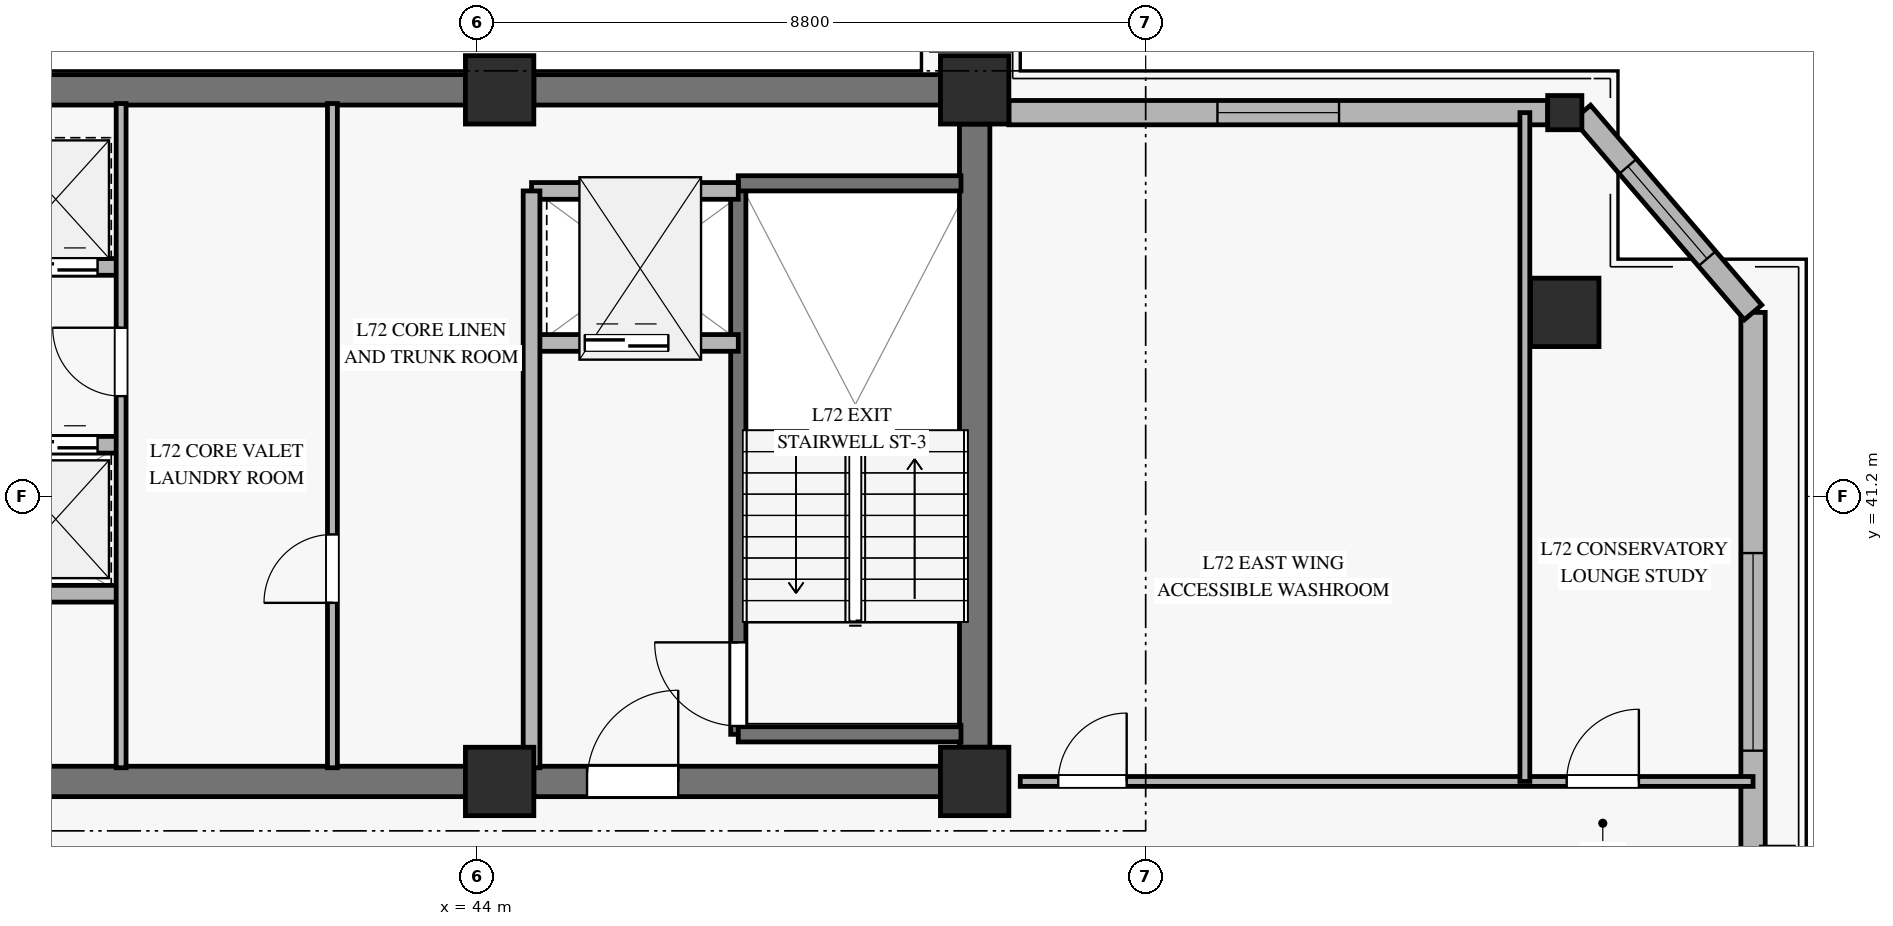
"""IFC4 building model, lengths in metres.
Left out: names, types, materials, properties, quantities, classifications, styles, units other than length and angle.
Written with IfcOpenShell. Run it as: python <this file> out.ifc"""

import sys

from ifc_helpers import new_model, si_unit, direction, frame, frame_2d, origin, origin_2d, place, context, subcontext, project, spatial, rectangle, hollow_rectangle, extrude, source, transform, mapped, element, fill, save


model = new_model("IFC4")
c1 = context("Model", 3, precision=1e-05, world=origin(), true_north=direction((0.0, 1.0)))
c2 = subcontext(c1, "Body", "Model", "MODEL_VIEW")
j1 = project(units=[si_unit("LENGTHUNIT", "METRE"), si_unit("PLANEANGLEUNIT", "RADIAN")], contexts=[c1])
p1 = place(None, origin())
s1 = spatial("IfcSite", under=j1, at=p1, CompositionType="ELEMENT")
p2 = place(p1, origin())
s2 = spatial("IfcBuilding", under=s1, at=p2, CompositionType="ELEMENT")
p3 = place(p2, frame((0.0, 0.0, 279.1)))
s3 = spatial("IfcBuildingStorey", under=s2, at=p3, CompositionType="ELEMENT", Elevation=279.1)
m1 = source(origin(), c2, "Body", "SweptSolid", [
    extrude(rectangle(XDim=0.9, YDim=0.9, at=origin_2d()), origin(), (0.0, 0.0, 1.0), 6.52),
])
for number, where, z_axis, x_axis in (
    (1, (44.3, 37.45, 0.0), (0.0, 0.0, 1.0), (1.0, 0.0, 0.0)),
    (2, (44.3, 46.55, 0.0), (0.0, 0.0, 1.0), (1.0, 0.0, 0.0)),
    (3, (50.55, 37.45, 0.0), (0.0, 0.0, 1.0), (1.0, 0.0, 0.0)),
    (4, (50.55, 46.55, 0.0), (0.0, 0.0, 1.0), (1.0, 0.0, 0.0)),
):
    element("IfcColumn", number, at=place(p3, frame(where, z_axis=z_axis, x_axis=x_axis)), inside=s3, PredefinedType="PILASTER", context=c2, shape_type="MappedRepresentation", body=[
        mapped(m1, transform((0.0, 0.0, 0.0), x_axis=(1.0, 0.0, 0.0), y_axis=(0.0, 1.0, 0.0), z_axis=(0.0, 0.0, 1.0), scale=1.0)),
    ])
p4 = place(p3, frame((36.05, 46.55, 0.0), z_axis=(0.0, 0.0, 1.0), x_axis=(1.0, 0.0, 0.0)))
e5 = element("IfcWall", 5, at=p4, inside=s3, PredefinedType="SHEAR", context=c2, shape_type="SweptSolid", body=[
    extrude(rectangle(XDim=7.8, YDim=0.4, at=frame_2d((3.9, 0.0))), origin(), (0.0, 0.0, 1.0), 6.52),
])
p5 = place(p3, frame((44.75, 46.55, 0.0), z_axis=(0.0, 0.0, 1.0), x_axis=(1.0, 0.0, 0.0)))
e6 = element("IfcWall", 6, at=p5, inside=s3, PredefinedType="SHEAR", context=c2, shape_type="SweptSolid", body=[
    extrude(rectangle(XDim=5.35, YDim=0.4, at=frame_2d((2.675, 0.0))), origin(), (0.0, 0.0, 1.0), 6.52),
])
p6 = place(p3, frame((36.05, 37.45, 0.0), z_axis=(0.0, 0.0, 1.0), x_axis=(1.0, 0.0, 0.0)))
e7 = element("IfcWall", 7, at=p6, inside=s3, PredefinedType="SHEAR", context=c2, shape_type="SweptSolid", body=[
    extrude(rectangle(XDim=7.8, YDim=0.4, at=frame_2d((3.9, 0.0))), origin(), (0.0, 0.0, 1.0), 6.52),
])
p7 = place(p3, frame((44.75, 37.45, 0.0), z_axis=(0.0, 0.0, 1.0), x_axis=(1.0, 0.0, 0.0)))
e8 = element("IfcWall", 8, at=p7, inside=s3, PredefinedType="SHEAR", context=c2, shape_type="SweptSolid", body=[
    extrude(rectangle(XDim=5.35, YDim=0.4, at=frame_2d((2.675, 0.0))), origin(), (0.0, 0.0, 1.0), 6.52),
])
p8 = place(p7, frame((0.7, 0.0, 0.0)))
e9 = element("IfcOpeningElement", 9, at=p8, cuts=e8, PredefinedType="OPENING", context=c2, shape_type="SweptSolid", body=[
    extrude(rectangle(XDim=1.2, YDim=2.15, at=frame_2d((0.6, 1.075))), frame((0.0, 0.21, 0.0), z_axis=(0.0, -1.0, 0.0), x_axis=(1.0, 0.0, 0.0)), (0.0, 0.0, 1.0), 0.42),
])
p9 = place(p3, frame((50.55, 37.9, 0.0), z_axis=(0.0, 0.0, 1.0), x_axis=(0.0, 1.0, 0.0)))
e10 = element("IfcWall", 10, at=p9, inside=s3, PredefinedType="SHEAR", context=c2, shape_type="SweptSolid", body=[
    extrude(rectangle(XDim=8.2, YDim=0.4, at=frame_2d((4.1, 0.0))), origin(), (0.0, 0.0, 1.0), 6.52),
])
m2 = source(origin(), c2, "Body", "SweptSolid", [
    extrude(hollow_rectangle(XDim=0.9, YDim=0.9, WallThickness=0.04, at=origin_2d()), origin(), (0.0, 0.0, 1.0), 6.52),
])
p10 = place(p3, frame((58.314, 43.622, 0.0), z_axis=(0.0, 0.0, 1.0), x_axis=(1.0, 0.0, 0.0)))
e11 = element("IfcColumn", 11, at=p10, inside=s3, PredefinedType="COLUMN", context=c2, shape_type="MappedRepresentation", body=[
    mapped(m2, transform((0.0, 0.0, 0.0), x_axis=(1.0, 0.0, 0.0), y_axis=(0.0, 1.0, 0.0), z_axis=(0.0, 0.0, 1.0), scale=1.0)),
])
m3 = source(origin(), c2, "Body", "SweptSolid", [
    extrude(hollow_rectangle(XDim=0.45, YDim=0.45, WallThickness=0.022, at=origin_2d()), origin(), (0.0, 0.0, 1.0), 6.52),
])
p11 = place(p3, frame((58.314, 46.25, 0.0), z_axis=(0.0, 0.0, 1.0), x_axis=(1.0, 0.0, 0.0)))
e12 = element("IfcColumn", 12, at=p11, inside=s3, PredefinedType="COLUMN", context=c2, shape_type="MappedRepresentation", body=[
    mapped(m3, transform((0.0, 0.0, 0.0), x_axis=(1.0, 0.0, 0.0), y_axis=(0.0, 1.0, 0.0), z_axis=(0.0, 0.0, 1.0), scale=1.0)),
])
p12 = place(p3, frame((60.791, 32.229, 0.0), z_axis=(0.0, 0.0, 1.0), x_axis=(0.0, 1.0, 0.0)))
e13 = element("IfcWall", 13, at=p12, inside=s3, PredefinedType="SOLIDWALL", context=c2, shape_type="SweptSolid", body=[
    extrude(rectangle(XDim=11.393, YDim=0.32, at=frame_2d((5.697, 0.0))), origin(), (0.0, 0.0, 1.0), 6.15),
])
p13 = place(p12, frame((5.626, 0.0, 0.45)))
e14 = element("IfcOpeningElement", 14, at=p13, cuts=e13, PredefinedType="OPENING", context=c2, shape_type="SweptSolid", body=[
    extrude(rectangle(XDim=2.6, YDim=2.4, at=frame_2d((1.3, 1.2))), frame((0.0, 0.17, 0.0), z_axis=(0.0, -1.0, 0.0), x_axis=(1.0, 0.0, 0.0)), (0.0, 0.0, 1.0), 0.34),
])
p14 = place(p3, frame((51.0, 46.25, 0.0), z_axis=(0.0, 0.0, 1.0), x_axis=(1.0, 0.0, 0.0)))
e15 = element("IfcWall", 15, at=p14, inside=s3, PredefinedType="SOLIDWALL", context=c2, shape_type="SweptSolid", body=[
    extrude(rectangle(XDim=7.089, YDim=0.32, at=frame_2d((3.544, 0.0))), origin(), (0.0, 0.0, 1.0), 6.15),
])
p15 = place(p14, frame((2.744, 0.0, 0.45)))
e16 = element("IfcOpeningElement", 16, at=p15, cuts=e15, PredefinedType="OPENING", context=c2, shape_type="SweptSolid", body=[
    extrude(rectangle(XDim=1.6, YDim=2.0, at=frame_2d((0.8, 1.0))), frame((0.0, 0.17, 0.0), z_axis=(0.0, -1.0, 0.0), x_axis=(1.0, 0.0, 0.0)), (0.0, 0.0, 1.0), 0.34),
])
p16 = place(p3, frame((60.791, 43.622, 0.0), z_axis=(0.0, 0.0, 1.0), x_axis=(-0.650698416405, 0.759336269968, 0.0)))
e17 = element("IfcWall", 17, at=p16, inside=s3, PredefinedType="SOLIDWALL", context=c2, shape_type="SweptSolid", body=[
    extrude(rectangle(XDim=3.461, YDim=0.3, at=frame_2d((1.73, 0.0))), origin(), (0.0, 0.0, 1.0), 6.15),
])
p17 = place(p16, frame((0.93, 0.0, 0.45)))
e18 = element("IfcOpeningElement", 18, at=p17, cuts=e17, PredefinedType="OPENING", context=c2, shape_type="SweptSolid", body=[
    extrude(rectangle(XDim=1.6, YDim=2.0, at=frame_2d((0.8, 1.0))), frame((0.0, 0.16, 0.0), z_axis=(0.0, -1.0, 0.0), x_axis=(1.0, 0.0, 0.0)), (0.0, 0.0, 1.0), 0.32),
])
p18 = place(p3, frame((47.44, 38.07, 0.0), z_axis=(0.0, 0.0, 1.0), x_axis=(0.0, 1.0, 0.0)))
e19 = element("IfcWall", 19, at=p18, inside=s3, PredefinedType="SOLIDWALL", context=c2, shape_type="SweptSolid", body=[
    extrude(rectangle(XDim=7.25, YDim=0.2, at=frame_2d((3.625, 0.0))), origin(), (0.0, 0.0, 1.0), 6.8),
])
p19 = place(p18, frame((0.11, 0.0, 0.0)))
e20 = element("IfcOpeningElement", 20, at=p19, cuts=e19, PredefinedType="OPENING", context=c2, shape_type="SweptSolid", body=[
    extrude(rectangle(XDim=1.1, YDim=2.15, at=frame_2d((0.55, 1.075))), frame((0.0, 0.11, 0.0), z_axis=(0.0, -1.0, 0.0), x_axis=(1.0, 0.0, 0.0)), (0.0, 0.0, 1.0), 0.22),
])
for number, where, z_axis, x_axis in (
    (21, (47.44, 45.32, 0.0), (0.0, 0.0, 1.0), (1.0, 0.0, 0.0)),
    (22, (47.44, 38.07, 0.0), (0.0, 0.0, 1.0), (1.0, 0.0, 0.0)),
):
    element("IfcWall", number, at=place(p3, frame(where, z_axis=z_axis, x_axis=x_axis)), inside=s3, PredefinedType="SOLIDWALL", context=c2, shape_type="SweptSolid", body=[
        extrude(rectangle(XDim=2.93, YDim=0.2, at=frame_2d((1.465, 0.0))), origin(), (0.0, 0.0, 1.0), 6.8),
    ])
p20 = place(p3, frame((44.72, 43.22, 0.0), z_axis=(0.0, 0.0, 1.0), x_axis=(1.0, 0.0, 0.0)))
e23 = element("IfcWall", 23, at=p20, inside=s3, PredefinedType="SOLIDWALL", context=c2, shape_type="SweptSolid", body=[
    extrude(rectangle(XDim=2.72, YDim=0.22, at=frame_2d((1.36, 0.0))), origin(), (0.0, 0.0, 1.0), 6.52),
])
p21 = place(p20, frame((0.7, 0.0, 0.0)))
e24 = element("IfcOpeningElement", 24, at=p21, cuts=e23, PredefinedType="OPENING", context=c2, shape_type="SweptSolid", body=[
    extrude(rectangle(XDim=1.1, YDim=2.2, at=frame_2d((0.55, 1.1))), frame((0.0, 0.12, 0.0), z_axis=(0.0, -1.0, 0.0), x_axis=(1.0, 0.0, 0.0)), (0.0, 0.0, 1.0), 0.24),
])
p22 = place(p3, frame((44.72, 45.22, 0.0), z_axis=(0.0, 0.0, 1.0), x_axis=(1.0, 0.0, 0.0)))
e25 = element("IfcWall", 25, at=p22, inside=s3, PredefinedType="SOLIDWALL", context=c2, shape_type="SweptSolid", body=[
    extrude(rectangle(XDim=2.72, YDim=0.22, at=frame_2d((1.36, 0.0))), origin(), (0.0, 0.0, 1.0), 6.52),
])
p23 = place(p3, frame((44.72, 37.63, 0.0), z_axis=(0.0, 0.0, 1.0), x_axis=(0.0, 1.0, 0.0)))
e26 = element("IfcWall", 26, at=p23, inside=s3, PredefinedType="SOLIDWALL", context=c2, shape_type="SweptSolid", body=[
    extrude(rectangle(XDim=7.59, YDim=0.22, at=frame_2d((3.795, 0.0))), origin(), (0.0, 0.0, 1.0), 6.52),
])
p24 = place(p3, frame((36.12, 44.22, 0.0), z_axis=(0.0, 0.0, 1.0), x_axis=(1.0, 0.0, 0.0)))
e27 = element("IfcWall", 27, at=p24, inside=s3, PredefinedType="SOLIDWALL", context=c2, shape_type="SweptSolid", body=[
    extrude(rectangle(XDim=3.2, YDim=0.22, at=frame_2d((1.6, 0.0))), origin(), (0.0, 0.0, 1.0), 6.52),
])
p25 = place(p24, frame((0.3, 0.0, 0.0)))
e28 = element("IfcOpeningElement", 28, at=p25, cuts=e27, PredefinedType="OPENING", context=c2, shape_type="SweptSolid", body=[
    extrude(rectangle(XDim=1.1, YDim=2.2, at=frame_2d((0.55, 1.1))), frame((0.0, 0.12, 0.0), z_axis=(0.0, -1.0, 0.0), x_axis=(1.0, 0.0, 0.0)), (0.0, 0.0, 1.0), 0.24),
])
p26 = place(p24, frame((1.79, 0.0, 0.0)))
e29 = element("IfcOpeningElement", 29, at=p26, cuts=e27, PredefinedType="OPENING", context=c2, shape_type="SweptSolid", body=[
    extrude(rectangle(XDim=1.1, YDim=2.2, at=frame_2d((0.55, 1.1))), frame((0.0, 0.12, 0.0), z_axis=(0.0, -1.0, 0.0), x_axis=(1.0, 0.0, 0.0)), (0.0, 0.0, 1.0), 0.24),
])
p27 = place(p3, frame((36.12, 41.88, 0.0), z_axis=(0.0, 0.0, 1.0), x_axis=(1.0, 0.0, 0.0)))
e30 = element("IfcWall", 30, at=p27, inside=s3, PredefinedType="SOLIDWALL", context=c2, shape_type="SweptSolid", body=[
    extrude(rectangle(XDim=3.2, YDim=0.22, at=frame_2d((1.6, 0.0))), origin(), (0.0, 0.0, 1.0), 6.52),
])
p28 = place(p27, frame((0.3, 0.0, 0.0)))
e31 = element("IfcOpeningElement", 31, at=p28, cuts=e30, PredefinedType="OPENING", context=c2, shape_type="SweptSolid", body=[
    extrude(rectangle(XDim=1.1, YDim=2.2, at=frame_2d((0.55, 1.1))), frame((0.0, 0.12, 0.0), z_axis=(0.0, -1.0, 0.0), x_axis=(1.0, 0.0, 0.0)), (0.0, 0.0, 1.0), 0.24),
])
p29 = place(p27, frame((1.79, 0.0, 0.0)))
e32 = element("IfcOpeningElement", 32, at=p29, cuts=e30, PredefinedType="OPENING", context=c2, shape_type="SweptSolid", body=[
    extrude(rectangle(XDim=1.1, YDim=2.2, at=frame_2d((0.55, 1.1))), frame((0.0, 0.12, 0.0), z_axis=(0.0, -1.0, 0.0), x_axis=(1.0, 0.0, 0.0)), (0.0, 0.0, 1.0), 0.24),
])
p30 = place(p3, frame((36.12, 39.92, 0.0), z_axis=(0.0, 0.0, 1.0), x_axis=(1.0, 0.0, 0.0)))
e33 = element("IfcWall", 33, at=p30, inside=s3, PredefinedType="SOLIDWALL", context=c2, shape_type="SweptSolid", body=[
    extrude(rectangle(XDim=3.2, YDim=0.22, at=frame_2d((1.6, 0.0))), origin(), (0.0, 0.0, 1.0), 6.52),
])
p31 = place(p3, frame((39.32, 37.63, 0.0), z_axis=(0.0, 0.0, 1.0), x_axis=(0.0, 1.0, 0.0)))
e34 = element("IfcWall", 34, at=p31, inside=s3, PredefinedType="PARTITIONING", context=c2, shape_type="SweptSolid", body=[
    extrude(rectangle(XDim=8.74, YDim=0.13, at=frame_2d((4.37, 0.0))), origin(), (0.0, 0.0, 1.0), 6.52),
])
p32 = place(p31, frame((4.89, 0.0, 0.0)))
e35 = element("IfcOpeningElement", 35, at=p32, cuts=e34, PredefinedType="OPENING", context=c2, shape_type="SweptSolid", body=[
    extrude(rectangle(XDim=0.9, YDim=2.1, at=frame_2d((0.45, 1.05))), frame((0.0, 0.075, 0.0), z_axis=(0.0, -1.0, 0.0), x_axis=(1.0, 0.0, 0.0)), (0.0, 0.0, 1.0), 0.15),
])
p33 = place(p3, frame((42.1, 37.63, 0.0), z_axis=(0.0, 0.0, 1.0), x_axis=(0.0, 1.0, 0.0)))
e36 = element("IfcWall", 36, at=p33, inside=s3, PredefinedType="PARTITIONING", context=c2, shape_type="SweptSolid", body=[
    extrude(rectangle(XDim=8.74, YDim=0.13, at=frame_2d((4.37, 0.0))), origin(), (0.0, 0.0, 1.0), 6.52),
])
p34 = place(p33, frame((2.17, 0.0, 0.0)))
e37 = element("IfcOpeningElement", 37, at=p34, cuts=e36, PredefinedType="OPENING", context=c2, shape_type="SweptSolid", body=[
    extrude(rectangle(XDim=0.9, YDim=2.1, at=frame_2d((0.45, 1.05))), frame((0.0, 0.075, 0.0), z_axis=(0.0, -1.0, 0.0), x_axis=(1.0, 0.0, 0.0)), (0.0, 0.0, 1.0), 0.15),
])
p35 = place(p3, frame((51.15, 37.45, 0.0), z_axis=(0.0, 0.0, 1.0), x_axis=(1.0, 0.0, 0.0)))
e38 = element("IfcWall", 38, at=p35, inside=s3, PredefinedType="PARTITIONING", context=c2, shape_type="SweptSolid", body=[
    extrude(rectangle(XDim=9.641, YDim=0.13, at=frame_2d((4.821, 0.0))), origin(), (0.0, 0.0, 1.0), 6.155),
])
p36 = place(p35, frame((0.5, 0.0, 0.0)))
e39 = element("IfcOpeningElement", 39, at=p36, cuts=e38, PredefinedType="OPENING", context=c2, shape_type="SweptSolid", body=[
    extrude(rectangle(XDim=0.9, YDim=2.1, at=frame_2d((0.45, 1.05))), frame((0.0, 0.075, 0.0), z_axis=(0.0, -1.0, 0.0), x_axis=(1.0, 0.0, 0.0)), (0.0, 0.0, 1.0), 0.15),
])
p37 = place(p35, frame((7.189, 0.0, 0.0)))
e40 = element("IfcOpeningElement", 40, at=p37, cuts=e38, PredefinedType="OPENING", context=c2, shape_type="SweptSolid", body=[
    extrude(rectangle(XDim=0.95, YDim=2.1, at=frame_2d((0.475, 1.05))), frame((0.0, 0.075, 0.0), z_axis=(0.0, -1.0, 0.0), x_axis=(1.0, 0.0, 0.0)), (0.0, 0.0, 1.0), 0.15),
])
p38 = place(p3, frame((57.789, 37.45, 0.0), z_axis=(0.0, 0.0, 1.0), x_axis=(0.0, 1.0, 0.0)))
e41 = element("IfcWall", 41, at=p38, inside=s3, PredefinedType="PARTITIONING", context=c2, shape_type="SweptSolid", body=[
    extrude(rectangle(XDim=8.8, YDim=0.13, at=frame_2d((4.4, 0.0))), origin(), (0.0, 0.0, 1.0), 6.52),
])
m4 = source(origin(), c2, "Body", "SweptSolid", [
    extrude(rectangle(XDim=2.6, YDim=2.4, at=frame_2d((1.3, 1.2))), frame((0.0, 0.03, 0.0), z_axis=(0.0, -1.0, 0.0), x_axis=(1.0, 0.0, 0.0)), (0.0, 0.0, 1.0), 0.06),
])
p39 = place(p13, origin())
e42 = element("IfcWindow", 42, at=p39, inside=s3, PartitioningType="SINGLE_PANEL", PredefinedType="WINDOW", context=c2, shape_type="MappedRepresentation", body=[
    mapped(m4, transform((0.0, 0.0, 0.0), x_axis=(1.0, 0.0, 0.0), y_axis=(0.0, 1.0, 0.0), z_axis=(0.0, 0.0, 1.0), scale=1.0)),
])
fill(e14, e42)
m5 = source(origin(), c2, "Body", "SweptSolid", [
    extrude(rectangle(XDim=1.6, YDim=2.0, at=frame_2d((0.8, 1.0))), frame((0.0, 0.03, 0.0), z_axis=(0.0, -1.0, 0.0), x_axis=(1.0, 0.0, 0.0)), (0.0, 0.0, 1.0), 0.06),
])
p40 = place(p15, origin())
e43 = element("IfcWindow", 43, at=p40, inside=s3, PartitioningType="SINGLE_PANEL", PredefinedType="WINDOW", context=c2, shape_type="MappedRepresentation", body=[
    mapped(m5, transform((0.0, 0.0, 0.0), x_axis=(1.0, 0.0, 0.0), y_axis=(0.0, 1.0, 0.0), z_axis=(0.0, 0.0, 1.0), scale=1.0)),
])
fill(e16, e43)
p41 = place(p17, origin())
e44 = element("IfcWindow", 44, at=p41, inside=s3, PartitioningType="SINGLE_PANEL", PredefinedType="WINDOW", context=c2, shape_type="MappedRepresentation", body=[
    mapped(m5, transform((0.0, 0.0, 0.0), x_axis=(1.0, 0.0, 0.0), y_axis=(0.0, 1.0, 0.0), z_axis=(0.0, 0.0, 1.0), scale=1.0)),
])
fill(e18, e44)
m6 = source(origin(), c2, "Body", "SweptSolid", [
    extrude(rectangle(XDim=1.1, YDim=2.15, at=frame_2d((0.55, 1.075))), frame((0.0, 0.025, 0.0), z_axis=(0.0, -1.0, 0.0), x_axis=(1.0, 0.0, 0.0)), (0.0, 0.0, 1.0), 0.05),
])
p42 = place(p19, origin())
e45 = element("IfcDoor", 45, at=p42, inside=s3, OperationType="SINGLE_SWING_RIGHT", PredefinedType="DOOR", context=c2, shape_type="MappedRepresentation", body=[
    mapped(m6, transform((0.0, 0.0, 0.0), x_axis=(1.0, 0.0, 0.0), y_axis=(0.0, 1.0, 0.0), z_axis=(0.0, 0.0, 1.0), scale=1.0)),
])
fill(e20, e45)
m7 = source(origin(), c2, "Body", "SweptSolid", [
    extrude(rectangle(XDim=1.1, YDim=2.2, at=frame_2d((0.55, 1.1))), frame((0.0, 0.025, 0.0), z_axis=(0.0, -1.0, 0.0), x_axis=(1.0, 0.0, 0.0)), (0.0, 0.0, 1.0), 0.05),
])
p43 = place(p21, origin())
e46 = element("IfcDoor", 46, at=p43, inside=s3, OperationType="SLIDING_TO_LEFT", PredefinedType="DOOR", context=c2, shape_type="MappedRepresentation", body=[
    mapped(m7, transform((0.0, 0.0, 0.0), x_axis=(1.0, 0.0, 0.0), y_axis=(0.0, 1.0, 0.0), z_axis=(0.0, 0.0, 1.0), scale=1.0)),
])
fill(e24, e46)
m8 = source(origin(), c2, "Body", "SweptSolid", [
    extrude(rectangle(XDim=1.2, YDim=2.15, at=frame_2d((0.6, 1.075))), frame((0.0, 0.025, 0.0), z_axis=(0.0, -1.0, 0.0), x_axis=(1.0, 0.0, 0.0)), (0.0, 0.0, 1.0), 0.05),
])
p44 = place(p8, origin())
e47 = element("IfcDoor", 47, at=p44, inside=s3, OperationType="SINGLE_SWING_RIGHT", PredefinedType="DOOR", context=c2, shape_type="MappedRepresentation", body=[
    mapped(m8, transform((0.0, 0.0, 0.0), x_axis=(1.0, 0.0, 0.0), y_axis=(0.0, 1.0, 0.0), z_axis=(0.0, 0.0, 1.0), scale=1.0)),
])
fill(e9, e47)
p45 = place(p26, origin())
e48 = element("IfcDoor", 48, at=p45, inside=s3, OperationType="SLIDING_TO_LEFT", PredefinedType="DOOR", context=c2, shape_type="MappedRepresentation", body=[
    mapped(m7, transform((0.0, 0.0, 0.0), x_axis=(1.0, 0.0, 0.0), y_axis=(0.0, 1.0, 0.0), z_axis=(0.0, 0.0, 1.0), scale=1.0)),
])
fill(e29, e48)
p46 = place(p29, origin())
e49 = element("IfcDoor", 49, at=p46, inside=s3, OperationType="SLIDING_TO_LEFT", PredefinedType="DOOR", context=c2, shape_type="MappedRepresentation", body=[
    mapped(m7, transform((0.0, 0.0, 0.0), x_axis=(1.0, 0.0, 0.0), y_axis=(0.0, 1.0, 0.0), z_axis=(0.0, 0.0, 1.0), scale=1.0)),
])
fill(e32, e49)
m9 = source(origin(), c2, "Body", "SweptSolid", [
    extrude(rectangle(XDim=0.9, YDim=2.1, at=frame_2d((0.45, 1.05))), frame((0.0, 0.025, 0.0), z_axis=(0.0, -1.0, 0.0), x_axis=(1.0, 0.0, 0.0)), (0.0, 0.0, 1.0), 0.05),
])
p47 = place(p32, origin())
e50 = element("IfcDoor", 50, at=p47, inside=s3, OperationType="SINGLE_SWING_RIGHT", PredefinedType="DOOR", context=c2, shape_type="MappedRepresentation", body=[
    mapped(m9, transform((0.0, 0.0, 0.0), x_axis=(1.0, 0.0, 0.0), y_axis=(0.0, 1.0, 0.0), z_axis=(0.0, 0.0, 1.0), scale=1.0)),
])
fill(e35, e50)
p48 = place(p34, origin())
e51 = element("IfcDoor", 51, at=p48, inside=s3, OperationType="SINGLE_SWING_LEFT", PredefinedType="DOOR", context=c2, shape_type="MappedRepresentation", body=[
    mapped(m9, transform((0.0, 0.0, 0.0), x_axis=(1.0, 0.0, 0.0), y_axis=(0.0, 1.0, 0.0), z_axis=(0.0, 0.0, 1.0), scale=1.0)),
])
fill(e37, e51)
p49 = place(p36, origin())
e52 = element("IfcDoor", 52, at=p49, inside=s3, OperationType="SINGLE_SWING_RIGHT", PredefinedType="DOOR", context=c2, shape_type="MappedRepresentation", body=[
    mapped(m9, transform((0.0, 0.0, 0.0), x_axis=(1.0, 0.0, 0.0), y_axis=(0.0, 1.0, 0.0), z_axis=(0.0, 0.0, 1.0), scale=1.0)),
])
fill(e39, e52)
m10 = source(origin(), c2, "Body", "SweptSolid", [
    extrude(rectangle(XDim=0.95, YDim=2.1, at=frame_2d((0.475, 1.05))), frame((0.0, 0.025, 0.0), z_axis=(0.0, -1.0, 0.0), x_axis=(1.0, 0.0, 0.0)), (0.0, 0.0, 1.0), 0.05),
])
p50 = place(p37, origin())
e53 = element("IfcDoor", 53, at=p50, inside=s3, OperationType="SINGLE_SWING_RIGHT", PredefinedType="DOOR", context=c2, shape_type="MappedRepresentation", body=[
    mapped(m10, transform((0.0, 0.0, 0.0), x_axis=(1.0, 0.0, 0.0), y_axis=(0.0, 1.0, 0.0), z_axis=(0.0, 0.0, 1.0), scale=1.0)),
])
fill(e40, e53)
save(model, sys.argv[1])
